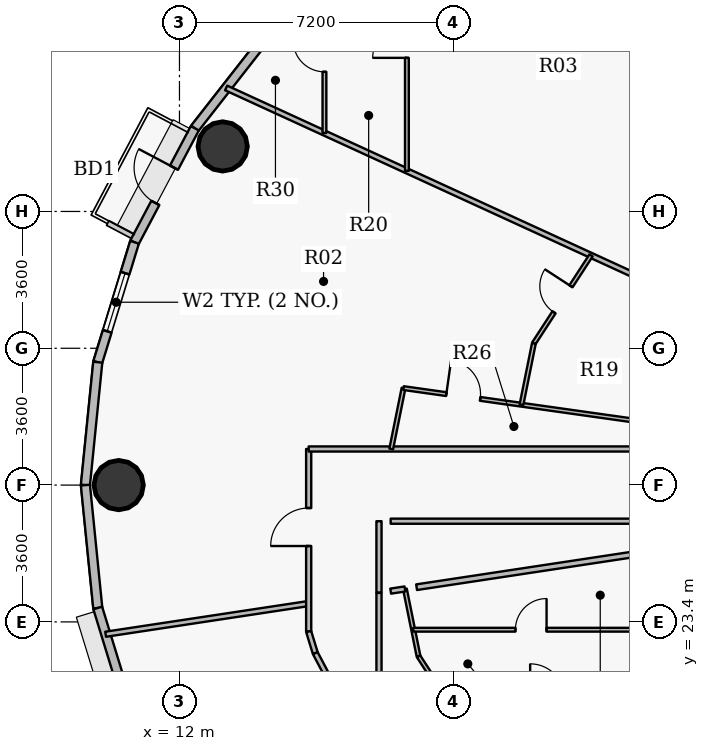
"""IFC4 building model, lengths in metres.
Left out: names, types, materials, properties, quantities, classifications, styles, units other than length and angle.
Written with IfcOpenShell. Run it as: python <this file> out.ifc"""

import sys

from ifc_helpers import new_model, si_unit, direction, frame, frame_2d, origin, origin_2d, place, context, subcontext, project, spatial, rectangle, hollow_circle, extrude, source, transform, mapped, element, fill, save


model = new_model("IFC4")
c1 = context("Model", 3, precision=1e-05, world=origin(), true_north=direction((0.0, 1.0)))
c2 = subcontext(c1, "Body", "Model", "MODEL_VIEW")
j1 = project(units=[si_unit("LENGTHUNIT", "METRE"), si_unit("PLANEANGLEUNIT", "RADIAN")], contexts=[c1])
p1 = place(None, origin())
s1 = spatial("IfcSite", under=j1, at=p1, CompositionType="ELEMENT")
p2 = place(p1, origin())
s2 = spatial("IfcBuilding", under=s1, at=p2, CompositionType="ELEMENT")
p3 = place(p2, frame((0.0, 0.0, 163.65)))
s3 = spatial("IfcBuildingStorey", under=s2, at=p3, CompositionType="ELEMENT", Elevation=163.65)
for number, where, z_axis, x_axis in (
    (1, (13.137, 35.911, 0.0), (0.0, 0.0, 1.0), (1.0, 0.0, 0.0)),
    (2, (10.4, 27.0, 0.0), (0.0, 0.0, 1.0), (1.0, 0.0, 0.0)),
):
    element("IfcColumn", number, at=place(p3, frame(where, z_axis=z_axis, x_axis=x_axis)), inside=s3, PredefinedType="COLUMN", context=c2, shape_type="SweptSolid", body=[
        extrude(hollow_circle(Radius=0.65, WallThickness=0.04, at=origin_2d()), origin(), (0.0, 0.0, 1.0), 3.75),
    ])
p4 = place(p3, frame((12.404, 36.388, 0.0), z_axis=(0.0, 0.0, 1.0), x_axis=(0.616287674549, 0.787521112224, 0.0)))
e3 = element("IfcWall", 3, at=p4, inside=s3, PredefinedType="SOLIDWALL", context=c2, shape_type="SweptSolid", body=[
    extrude(rectangle(XDim=3.517, YDim=0.24, at=frame_2d((1.759, 0.0))), origin(), (0.0, 0.0, 1.0), 3.5),
])
p5 = place(p3, frame((10.817, 33.389, 0.0), z_axis=(0.0, 0.0, 1.0), x_axis=(0.467586874938, 0.88394712194, 0.0)))
e4 = element("IfcWall", 4, at=p5, inside=s3, PredefinedType="SOLIDWALL", context=c2, shape_type="SweptSolid", body=[
    extrude(rectangle(XDim=3.393, YDim=0.24, at=frame_2d((1.697, 0.0))), origin(), (0.0, 0.0, 1.0), 3.5),
])
p6 = place(p5, frame((1.172, 0.0, 0.0)))
e5 = element("IfcOpeningElement", 5, at=p6, cuts=e4, PredefinedType="OPENING", context=c2, shape_type="SweptSolid", body=[
    extrude(rectangle(XDim=1.05, YDim=2.15, at=origin_2d()), frame((0.525, 0.13, 1.075), z_axis=(0.0, -1.0, 0.0), x_axis=(1.0, 0.0, 0.0)), (0.0, 0.0, 1.0), 0.26),
])
p7 = place(p3, frame((9.85, 30.234, 0.0), z_axis=(0.0, 0.0, 1.0), x_axis=(0.293097995113, 0.956082405058, 0.0)))
e6 = element("IfcWall", 6, at=p7, inside=s3, PredefinedType="SOLIDWALL", context=c2, shape_type="SweptSolid", body=[
    extrude(rectangle(XDim=3.3, YDim=0.24, at=frame_2d((1.65, 0.0))), origin(), (0.0, 0.0, 1.0), 3.5),
])
p8 = place(p7, frame((0.85, 0.0, 0.9)))
e7 = element("IfcOpeningElement", 7, at=p8, cuts=e6, PredefinedType="OPENING", context=c2, shape_type="SweptSolid", body=[
    extrude(rectangle(XDim=1.6, YDim=1.75, at=origin_2d()), frame((0.8, 0.13, 0.875), z_axis=(0.0, -1.0, 0.0), x_axis=(1.0, 0.0, 0.0)), (0.0, 0.0, 1.0), 0.26),
])
for number, where, z_axis, x_axis in (
    (8, (9.525, 27.0, 0.0), (0.0, 0.0, 1.0), (0.1, 0.995, 0.0)),
    (9, (9.85, 23.766, 0.0), (0.0, 0.0, 1.0), (-0.1, 0.995, 0.0)),
):
    element("IfcWall", number, at=place(p3, frame(where, z_axis=z_axis, x_axis=x_axis)), inside=s3, PredefinedType="SOLIDWALL", context=c2, shape_type="SweptSolid", body=[
        extrude(rectangle(XDim=3.25, YDim=0.24, at=frame_2d((1.625, 0.0))), origin(), (0.0, 0.0, 1.0), 3.5),
    ])
p9 = place(p3, frame((10.817, 20.611, 0.0), z_axis=(0.0, 0.0, 1.0), x_axis=(-0.293097995113, 0.956082405058, 0.0)))
e10 = element("IfcWall", 10, at=p9, inside=s3, PredefinedType="SOLIDWALL", context=c2, shape_type="SweptSolid", body=[
    extrude(rectangle(XDim=3.3, YDim=0.24, at=frame_2d((1.65, 0.0))), origin(), (0.0, 0.0, 1.0), 3.5),
])
p10 = place(p3, frame((10.057, 23.075, 0.0), z_axis=(0.0, 0.0, 1.0), x_axis=(0.988756022356, 0.14953771516, 0.0)))
e11 = element("IfcWall", 11, at=p10, inside=s3, PredefinedType="PARTITIONING", context=c2, shape_type="SweptSolid", body=[
    extrude(rectangle(XDim=5.404, YDim=0.135, at=frame_2d((2.702, 0.0))), origin(), (0.0, 0.0, 1.0), 2.935),
])
p11 = place(p3, frame((13.229, 37.45, 0.0), z_axis=(0.0, 0.0, 1.0), x_axis=(0.908867611309, -0.417084721746, 0.0)))
e12 = element("IfcWall", 12, at=p11, inside=s3, PredefinedType="PARTITIONING", context=c2, shape_type="SweptSolid", body=[
    extrude(rectangle(XDim=12.237, YDim=0.135, at=frame_2d((6.118, 0.0))), origin(), (0.0, 0.0, 1.0), 2.935),
])
p12 = place(p3, frame((15.4, 23.146, 0.0), z_axis=(0.0, 0.0, 1.0), x_axis=(0.0, 1.0, 0.0)))
e13 = element("IfcWall", 13, at=p12, inside=s3, PredefinedType="PARTITIONING", context=c2, shape_type="SweptSolid", body=[
    extrude(rectangle(XDim=4.804, YDim=0.135, at=frame_2d((2.402, 0.0))), origin(), (0.0, 0.0, 1.0), 2.935),
])
p13 = place(p12, frame((2.251, 0.0, 0.0)))
e14 = element("IfcOpeningElement", 14, at=p13, cuts=e13, PredefinedType="OPENING", context=c2, shape_type="SweptSolid", body=[
    extrude(rectangle(XDim=1.0, YDim=2.15, at=origin_2d()), frame((0.5, 0.078, 1.075), z_axis=(0.0, -1.0, 0.0), x_axis=(1.0, 0.0, 0.0)), (0.0, 0.0, 1.0), 0.155),
])
p14 = place(p3, frame((15.4, 23.146, 0.0), z_axis=(0.0, 0.0, 1.0), x_axis=(0.293335154151, -0.956009669061, 0.0)))
e15 = element("IfcWall", 15, at=p14, inside=s3, PredefinedType="PARTITIONING", context=c2, shape_type="SweptSolid", body=[
    extrude(rectangle(XDim=0.594, YDim=0.135, at=frame_2d((0.297, 0.0))), origin(), (0.0, 0.0, 1.0), 3.5),
])
p15 = place(p3, frame((15.4, 27.95, 0.0), z_axis=(0.0, 0.0, 1.0), x_axis=(1.0, 0.0, 0.0)))
e16 = element("IfcWall", 16, at=p15, inside=s3, PredefinedType="PARTITIONING", context=c2, shape_type="SweptSolid", body=[
    extrude(rectangle(XDim=8.95, YDim=0.135, at=frame_2d((4.475, 0.0))), origin(), (0.0, 0.0, 1.0), 3.5),
])
p16 = place(p3, frame((15.574, 22.578, 0.0), z_axis=(0.0, 0.0, 1.0), x_axis=(0.46757196543, -0.883955008552, 0.0)))
e17 = element("IfcWall", 17, at=p16, inside=s3, PredefinedType="PARTITIONING", context=c2, shape_type="SweptSolid", body=[
    extrude(rectangle(XDim=2.451, YDim=0.135, at=frame_2d((1.226, 0.0))), origin(), (0.0, 0.0, 1.0), 2.935),
])
p17 = place(p3, frame((15.815, 36.263, 0.0), z_axis=(0.0, 0.0, 1.0), x_axis=(0.0, 1.0, 0.0)))
e18 = element("IfcWall", 18, at=p17, inside=s3, PredefinedType="PARTITIONING", context=c2, shape_type="SweptSolid", body=[
    extrude(rectangle(XDim=4.042, YDim=0.1, at=frame_2d((2.021, 0.0))), origin(), (0.0, 0.0, 1.0), 2.935),
])
p18 = place(p17, frame((1.611, 0.0, 0.0)))
e19 = element("IfcOpeningElement", 19, at=p18, cuts=e18, PredefinedType="OPENING", context=c2, shape_type="SweptSolid", body=[
    extrude(rectangle(XDim=0.82, YDim=2.1, at=origin_2d()), frame((0.41, 0.06, 1.05), z_axis=(0.0, -1.0, 0.0), x_axis=(1.0, 0.0, 0.0)), (0.0, 0.0, 1.0), 0.12),
])
p19 = place(p3, frame((17.25, 19.734, 0.0), z_axis=(0.0, 0.0, 1.0), x_axis=(0.0, 1.0, 0.0)))
e20 = element("IfcWall", 20, at=p19, inside=s3, PredefinedType="PARTITIONING", context=c2, shape_type="SweptSolid", body=[
    extrude(rectangle(XDim=4.429, YDim=0.135, at=frame_2d((2.215, 0.0))), origin(), (0.0, 0.0, 1.0), 2.935),
])
p20 = place(p3, frame((17.572, 27.95, 0.0), z_axis=(0.0, 0.0, 1.0), x_axis=(0.19821259699, 0.98015905158, 0.0)))
e21 = element("IfcWall", 21, at=p20, inside=s3, PredefinedType="PARTITIONING", context=c2, shape_type="SweptSolid", body=[
    extrude(rectangle(XDim=1.635, YDim=0.1, at=frame_2d((0.817, 0.0))), origin(), (0.0, 0.0, 1.0), 3.5),
])
p21 = place(p3, frame((17.896, 29.552, 0.0), z_axis=(0.0, 0.0, 1.0), x_axis=(0.990212218954, -0.139569915938, 0.0)))
e22 = element("IfcWall", 22, at=p21, inside=s3, PredefinedType="PARTITIONING", context=c2, shape_type="SweptSolid", body=[
    extrude(rectangle(XDim=6.518, YDim=0.1, at=frame_2d((3.259, 0.0))), origin(), (0.0, 0.0, 1.0), 3.5),
])
p22 = place(p21, frame((1.137, 0.0, 0.0)))
e23 = element("IfcOpeningElement", 23, at=p22, cuts=e22, PredefinedType="OPENING", context=c2, shape_type="SweptSolid", body=[
    extrude(rectangle(XDim=0.9, YDim=2.1, at=origin_2d()), frame((0.45, 0.06, 1.05), z_axis=(0.0, -1.0, 0.0), x_axis=(1.0, 0.0, 0.0)), (0.0, 0.0, 1.0), 0.12),
])
p23 = place(p3, frame((17.933, 24.267, 0.0), z_axis=(0.0, 0.0, 1.0), x_axis=(0.198166528342, -0.980168366682, 0.0)))
e24 = element("IfcWall", 24, at=p23, inside=s3, PredefinedType="PARTITIONING", context=c2, shape_type="SweptSolid", body=[
    extrude(rectangle(XDim=1.809, YDim=0.1, at=frame_2d((0.904, 0.0))), origin(), (0.0, 0.0, 1.0), 2.935),
])
p24 = place(p3, frame((17.984, 35.267, 0.0), z_axis=(0.0, 0.0, 1.0), x_axis=(0.0, 1.0, 0.0)))
e25 = element("IfcWall", 25, at=p24, inside=s3, PredefinedType="PARTITIONING", context=c2, shape_type="SweptSolid", body=[
    extrude(rectangle(XDim=6.848, YDim=0.1, at=frame_2d((3.424, 0.0))), origin(), (0.0, 0.0, 1.0), 2.935),
])
p25 = place(p24, frame((2.974, 0.0, 0.0)))
e26 = element("IfcOpeningElement", 26, at=p25, cuts=e25, PredefinedType="OPENING", context=c2, shape_type="SweptSolid", body=[
    extrude(rectangle(XDim=0.9, YDim=2.1, at=origin_2d()), frame((0.45, 0.06, 1.05), z_axis=(0.0, -1.0, 0.0), x_axis=(1.0, 0.0, 0.0)), (0.0, 0.0, 1.0), 0.12),
])
p26 = place(p3, frame((18.15, 23.195, 0.0), z_axis=(0.0, 0.0, 1.0), x_axis=(1.0, 0.0, 0.0)))
e27 = element("IfcWall", 27, at=p26, inside=s3, PredefinedType="PARTITIONING", context=c2, shape_type="SweptSolid", body=[
    extrude(rectangle(XDim=6.2, YDim=0.1, at=frame_2d((3.1, 0.0))), origin(), (0.0, 0.0, 1.0), 2.935),
])
p27 = place(p26, frame((2.69, 0.0, 0.0)))
e28 = element("IfcOpeningElement", 28, at=p27, cuts=e27, PredefinedType="OPENING", context=c2, shape_type="SweptSolid", body=[
    extrude(rectangle(XDim=0.82, YDim=2.1, at=origin_2d()), frame((0.41, 0.06, 1.05), z_axis=(0.0, -1.0, 0.0), x_axis=(1.0, 0.0, 0.0)), (0.0, 0.0, 1.0), 0.12),
])
p28 = place(p3, frame((18.291, 22.494, 0.0), z_axis=(0.0, 0.0, 1.0), x_axis=(0.545405921784, -0.838172047066, 0.0)))
e29 = element("IfcWall", 29, at=p28, inside=s3, PredefinedType="PARTITIONING", context=c2, shape_type="SweptSolid", body=[
    extrude(rectangle(XDim=4.849, YDim=0.1, at=frame_2d((2.425, 0.0))), origin(), (0.0, 0.0, 1.0), 2.935),
])
p29 = place(p28, frame((1.962, 0.0, 0.0)))
e30 = element("IfcOpeningElement", 30, at=p29, cuts=e29, PredefinedType="OPENING", context=c2, shape_type="SweptSolid", body=[
    extrude(rectangle(XDim=0.9, YDim=2.1, at=origin_2d()), frame((0.45, 0.06, 1.05), z_axis=(0.0, -1.0, 0.0), x_axis=(1.0, 0.0, 0.0)), (0.0, 0.0, 1.0), 0.12),
])
p30 = place(p3, frame((21.0, 29.115, 0.0), z_axis=(0.0, 0.0, 1.0), x_axis=(0.198219197437, 0.980157716782, 0.0)))
e31 = element("IfcWall", 31, at=p30, inside=s3, PredefinedType="PARTITIONING", context=c2, shape_type="SweptSolid", body=[
    extrude(rectangle(XDim=1.652, YDim=0.1, at=frame_2d((0.826, 0.0))), origin(), (0.0, 0.0, 1.0), 3.5),
])
p31 = place(p3, frame((21.327, 30.733, 0.0), z_axis=(0.0, 0.0, 1.0), x_axis=(0.545365017792, 0.838198662233, 0.0)))
e32 = element("IfcWall", 32, at=p31, inside=s3, PredefinedType="PARTITIONING", context=c2, shape_type="SweptSolid", body=[
    extrude(rectangle(XDim=2.756, YDim=0.1, at=frame_2d((1.378, 0.0))), origin(), (0.0, 0.0, 1.0), 2.935),
])
p32 = place(p31, frame((0.968, 0.0, 0.0)))
e33 = element("IfcOpeningElement", 33, at=p32, cuts=e32, PredefinedType="OPENING", context=c2, shape_type="SweptSolid", body=[
    extrude(rectangle(XDim=0.82, YDim=2.1, at=origin_2d()), frame((0.41, 0.06, 1.05), z_axis=(0.0, -1.0, 0.0), x_axis=(1.0, 0.0, 0.0)), (0.0, 0.0, 1.0), 0.12),
])
p33 = place(p3, frame((17.25, 26.05, 0.0), z_axis=(0.0, 0.0, 1.0), x_axis=(0.0, -1.0, 0.0)))
e34 = element("IfcWall", 34, at=p33, inside=s3, PredefinedType="PARTITIONING", context=c2, shape_type="SweptSolid", body=[
    extrude(rectangle(XDim=1.876, YDim=0.135, at=frame_2d((0.938, 0.0))), origin(), (0.0, 0.0, 1.0), 3.085),
])
p34 = place(p3, frame((24.042, 26.05, 0.0), z_axis=(0.0, 0.0, 1.0), x_axis=(-1.0, 0.0, 0.0)))
e35 = element("IfcWall", 35, at=p34, inside=s3, PredefinedType="PARTITIONING", context=c2, shape_type="SweptSolid", body=[
    extrude(rectangle(XDim=6.485, YDim=0.135, at=frame_2d((3.242, 0.0))), origin(), (0.0, 0.0, 1.0), 3.5),
])
p35 = place(p3, frame((17.558, 24.21, 0.0), z_axis=(0.0, 0.0, 1.0), x_axis=(0.988703952477, 0.149881601124, 0.0)))
e36 = element("IfcWall", 36, at=p35, inside=s3, PredefinedType="PARTITIONING", context=c2, shape_type="SweptSolid", body=[
    extrude(rectangle(XDim=0.38, YDim=0.135, at=frame_2d((0.19, 0.0))), origin(), (0.0, 0.0, 1.0), 3.085),
])
p36 = place(p3, frame((18.24, 24.313, 0.0), z_axis=(0.0, 0.0, 1.0), x_axis=(0.988751262043, 0.149569187364, 0.0)))
e37 = element("IfcWall", 37, at=p36, inside=s3, PredefinedType="PARTITIONING", context=c2, shape_type="SweptSolid", body=[
    extrude(rectangle(XDim=5.848, YDim=0.15, at=frame_2d((2.924, 0.0))), origin(), (0.0, 0.0, 1.0), 3.5),
])
m1 = source(origin(), c2, "Body", "SweptSolid", [
    extrude(rectangle(XDim=1.05, YDim=2.15, at=origin_2d()), frame((0.525, 0.025, 1.075), z_axis=(0.0, -1.0, 0.0), x_axis=(1.0, 0.0, 0.0)), (0.0, 0.0, 1.0), 0.05),
])
p37 = place(p6, origin())
e38 = element("IfcDoor", 38, at=p37, inside=s3, OperationType="SINGLE_SWING_RIGHT", PredefinedType="DOOR", context=c2, shape_type="MappedRepresentation", body=[
    mapped(m1, transform((0.0, 0.0, 0.0), x_axis=(1.0, 0.0, 0.0), y_axis=(0.0, 1.0, 0.0), z_axis=(0.0, 0.0, 1.0), scale=1.0)),
])
fill(e5, e38)
m2 = source(origin(), c2, "Body", "SweptSolid", [
    extrude(rectangle(XDim=1.6, YDim=1.75, at=origin_2d()), frame((0.8, 0.03, 0.875), z_axis=(0.0, -1.0, 0.0), x_axis=(1.0, 0.0, 0.0)), (0.0, 0.0, 1.0), 0.06),
])
p38 = place(p8, origin())
e39 = element("IfcWindow", 39, at=p38, inside=s3, PartitioningType="DOUBLE_PANEL_VERTICAL", PredefinedType="WINDOW", context=c2, shape_type="MappedRepresentation", body=[
    mapped(m2, transform((0.0, 0.0, 0.0), x_axis=(1.0, 0.0, 0.0), y_axis=(0.0, 1.0, 0.0), z_axis=(0.0, 0.0, 1.0), scale=1.0)),
])
fill(e7, e39)
m3 = source(origin(), c2, "Body", "SweptSolid", [
    extrude(rectangle(XDim=0.9, YDim=2.1, at=origin_2d()), frame((0.45, 0.025, 1.05), z_axis=(0.0, -1.0, 0.0), x_axis=(1.0, 0.0, 0.0)), (0.0, 0.0, 1.0), 0.05),
])
p39 = place(p25, origin())
e40 = element("IfcDoor", 40, at=p39, inside=s3, OperationType="SINGLE_SWING_LEFT", PredefinedType="DOOR", context=c2, shape_type="MappedRepresentation", body=[
    mapped(m3, transform((0.0, 0.0, 0.0), x_axis=(1.0, 0.0, 0.0), y_axis=(0.0, 1.0, 0.0), z_axis=(0.0, 0.0, 1.0), scale=1.0)),
])
fill(e26, e40)
m4 = source(origin(), c2, "Body", "SweptSolid", [
    extrude(rectangle(XDim=0.82, YDim=2.1, at=origin_2d()), frame((0.41, 0.025, 1.05), z_axis=(0.0, -1.0, 0.0), x_axis=(1.0, 0.0, 0.0)), (0.0, 0.0, 1.0), 0.05),
])
p40 = place(p18, origin())
e41 = element("IfcDoor", 41, at=p40, inside=s3, OperationType="SINGLE_SWING_RIGHT", PredefinedType="DOOR", context=c2, shape_type="MappedRepresentation", body=[
    mapped(m4, transform((0.0, 0.0, 0.0), x_axis=(1.0, 0.0, 0.0), y_axis=(0.0, 1.0, 0.0), z_axis=(0.0, 0.0, 1.0), scale=1.0)),
])
fill(e19, e41)
m5 = source(origin(), c2, "Body", "SweptSolid", [
    extrude(rectangle(XDim=1.0, YDim=2.15, at=origin_2d()), frame((0.5, 0.025, 1.075), z_axis=(0.0, -1.0, 0.0), x_axis=(1.0, 0.0, 0.0)), (0.0, 0.0, 1.0), 0.05),
])
p41 = place(p13, origin())
e42 = element("IfcDoor", 42, at=p41, inside=s3, OperationType="SINGLE_SWING_LEFT", PredefinedType="DOOR", context=c2, shape_type="MappedRepresentation", body=[
    mapped(m5, transform((0.0, 0.0, 0.0), x_axis=(1.0, 0.0, 0.0), y_axis=(0.0, 1.0, 0.0), z_axis=(0.0, 0.0, 1.0), scale=1.0)),
])
fill(e14, e42)
p42 = place(p32, origin())
e43 = element("IfcDoor", 43, at=p42, inside=s3, OperationType="SINGLE_SWING_RIGHT", PredefinedType="DOOR", context=c2, shape_type="MappedRepresentation", body=[
    mapped(m4, transform((0.0, 0.0, 0.0), x_axis=(1.0, 0.0, 0.0), y_axis=(0.0, 1.0, 0.0), z_axis=(0.0, 0.0, 1.0), scale=1.0)),
])
fill(e33, e43)
p43 = place(p22, origin())
e44 = element("IfcDoor", 44, at=p43, inside=s3, OperationType="SINGLE_SWING_LEFT", PredefinedType="DOOR", context=c2, shape_type="MappedRepresentation", body=[
    mapped(m3, transform((0.0, 0.0, 0.0), x_axis=(1.0, 0.0, 0.0), y_axis=(0.0, 1.0, 0.0), z_axis=(0.0, 0.0, 1.0), scale=1.0)),
])
fill(e23, e44)
p44 = place(p27, origin())
e45 = element("IfcDoor", 45, at=p44, inside=s3, OperationType="SINGLE_SWING_RIGHT", PredefinedType="DOOR", context=c2, shape_type="MappedRepresentation", body=[
    mapped(m4, transform((0.0, 0.0, 0.0), x_axis=(1.0, 0.0, 0.0), y_axis=(0.0, 1.0, 0.0), z_axis=(0.0, 0.0, 1.0), scale=1.0)),
])
fill(e28, e45)
save(model, sys.argv[1])
